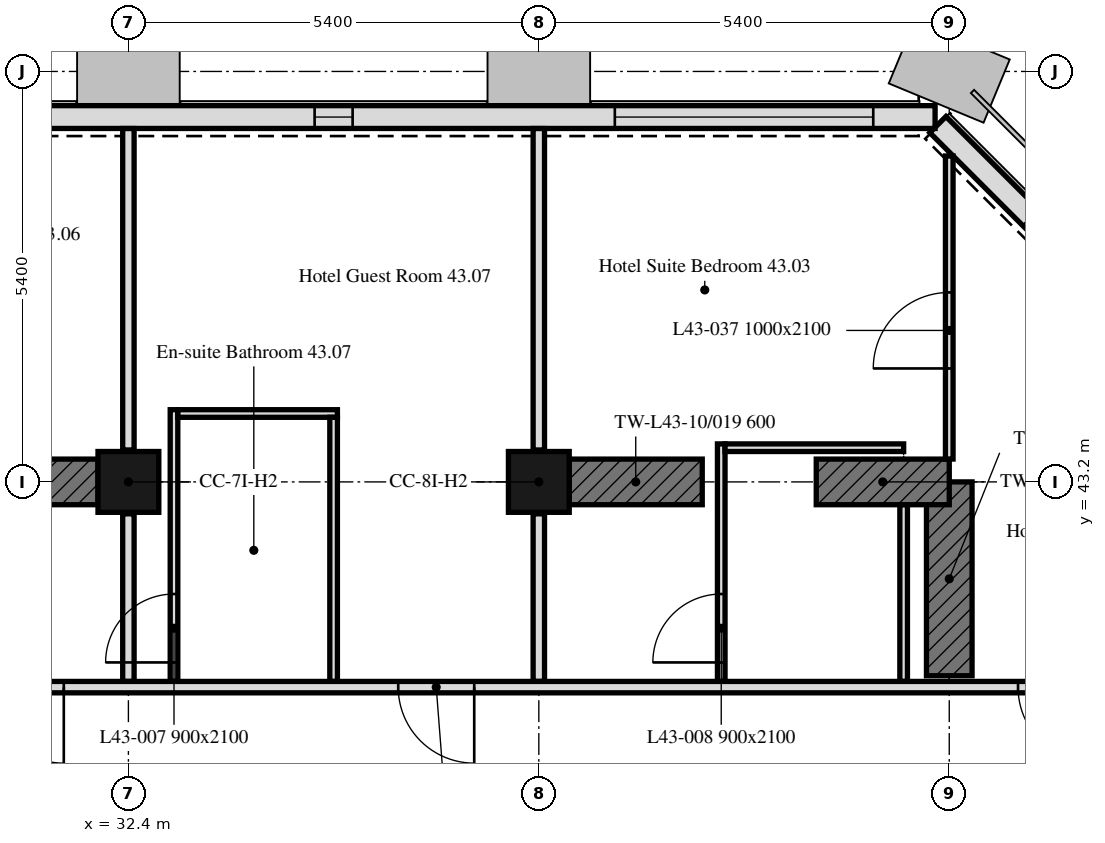
"""IFC4 building model, lengths in metres.
Left out: names, types, materials, properties, quantities, classifications, styles, units other than length and angle.
Written with IfcOpenShell. Run it as: python <this file> out.ifc"""

import sys

from ifc_helpers import new_model, si_unit, direction, frame, frame_2d, origin, origin_2d, place, context, subcontext, project, spatial, rectangle, extrude, element, fill, save


model = new_model("IFC4")
c1 = context("Model", 3, precision=1e-05, world=origin(), true_north=direction((0.0, 1.0)))
c2 = subcontext(c1, "Body", "Model", "MODEL_VIEW")
j1 = project(units=[si_unit("LENGTHUNIT", "METRE"), si_unit("PLANEANGLEUNIT", "RADIAN")], contexts=[c1])
p1 = place(None, origin())
s1 = spatial("IfcSite", under=j1, at=p1, CompositionType="ELEMENT")
p2 = place(p1, origin())
s2 = spatial("IfcBuilding", under=s1, at=p2, CompositionType="ELEMENT")
p3 = place(p2, frame((0.0, 0.0, 180.7)))
s3 = spatial("IfcBuildingStorey", under=s2, at=p3, CompositionType="ELEMENT", Elevation=180.7)
for number, where, z_axis, x_axis in (
    (1, (32.4, 43.2, 0.0), (0.0, 0.0, 1.0), (1.0, 0.0, 0.0)),
    (2, (37.8, 43.2, 0.0), (0.0, 0.0, 1.0), (1.0, 0.0, 0.0)),
):
    element("IfcColumn", number, at=place(p3, frame(where, z_axis=z_axis, x_axis=x_axis)), inside=s3, PredefinedType="COLUMN", context=c2, shape_type="SweptSolid", body=[
        extrude(rectangle(XDim=0.8, YDim=0.8, at=origin_2d()), origin(), (0.0, 0.0, 1.0), 3.0),
    ])
p4 = place(p3, frame((43.2, 40.65, 0.0), z_axis=(0.0, 0.0, 1.0), x_axis=(0.0, 1.0, 0.0)))
e3 = element("IfcWall", 3, at=p4, inside=s3, PredefinedType="SHEAR", context=c2, shape_type="SweptSolid", body=[
    extrude(rectangle(XDim=2.55, YDim=0.6, at=frame_2d((1.275, 0.0))), origin(), (0.0, 0.0, 1.0), 3.0),
])
p5 = place(p3, frame((30.45, 43.2, 0.0), z_axis=(0.0, 0.0, 1.0), x_axis=(1.0, 0.0, 0.0)))
e4 = element("IfcWall", 4, at=p5, inside=s3, PredefinedType="SHEAR", context=c2, shape_type="SweptSolid", body=[
    extrude(rectangle(XDim=1.55, YDim=0.6, at=frame_2d((0.775, 0.0))), origin(), (0.0, 0.0, 1.0), 3.0),
])
for number, where, z_axis, x_axis in (
    (5, (38.2, 43.2, 0.0), (0.0, 0.0, 1.0), (1.0, 0.0, 0.0)),
    (6, (41.45, 43.2, 0.0), (0.0, 0.0, 1.0), (1.0, 0.0, 0.0)),
):
    element("IfcWall", number, at=place(p3, frame(where, z_axis=z_axis, x_axis=x_axis)), inside=s3, PredefinedType="SHEAR", context=c2, shape_type="SweptSolid", body=[
        extrude(rectangle(XDim=1.75, YDim=0.6, at=frame_2d((0.875, 0.0))), origin(), (0.0, 0.0, 1.0), 3.0),
    ])
p6 = place(p3, frame((47.901, 43.051, 0.0), z_axis=(0.0, 0.0, 1.0), x_axis=(-0.707106781187, 0.707106781187, 0.0)))
e7 = element("IfcWall", 7, at=p6, inside=s3, PredefinedType="SOLIDWALL", context=c2, shape_type="SweptSolid", body=[
    extrude(rectangle(XDim=6.86, YDim=0.3, at=frame_2d((3.43, 0.0))), origin(), (0.0, 0.0, 1.0), 3.0),
])
p7 = place(p6, frame((1.73, 0.0, 0.9)))
e8 = element("IfcOpeningElement", 8, at=p7, cuts=e7, PredefinedType="OPENING", context=c2, shape_type="SweptSolid", body=[
    extrude(rectangle(XDim=3.4, YDim=1.7, at=frame_2d((1.7, 0.85))), frame((0.0, 0.16, 0.0), z_axis=(0.0, -1.0, 0.0), x_axis=(1.0, 0.0, 0.0)), (0.0, 0.0, 1.0), 0.32),
])
p8 = place(p3, frame((43.014, 48.0, 0.0), z_axis=(0.0, 0.0, 1.0), x_axis=(-1.0, 0.0, 0.0)))
e9 = element("IfcWall", 9, at=p8, inside=s3, PredefinedType="SOLIDWALL", context=c2, shape_type="SweptSolid", body=[
    extrude(rectangle(XDim=32.027, YDim=0.3, at=frame_2d((16.014, 0.0))), origin(), (0.0, 0.0, 1.0), 3.0),
])
p9 = place(p8, frame((0.814, 0.0, 0.9)))
e10 = element("IfcOpeningElement", 10, at=p9, cuts=e9, PredefinedType="OPENING", context=c2, shape_type="SweptSolid", body=[
    extrude(rectangle(XDim=3.4, YDim=1.7, at=frame_2d((1.7, 0.85))), frame((0.0, 0.16, 0.0), z_axis=(0.0, -1.0, 0.0), x_axis=(1.0, 0.0, 0.0)), (0.0, 0.0, 1.0), 0.32),
])
p10 = place(p8, frame((7.664, 0.0, 0.9)))
e11 = element("IfcOpeningElement", 11, at=p10, cuts=e9, PredefinedType="OPENING", context=c2, shape_type="SweptSolid", body=[
    extrude(rectangle(XDim=0.5, YDim=1.7, at=frame_2d((0.25, 0.85))), frame((0.0, 0.16, 0.0), z_axis=(0.0, -1.0, 0.0), x_axis=(1.0, 0.0, 0.0)), (0.0, 0.0, 1.0), 0.32),
])
p11 = place(p8, frame((13.064, 0.0, 0.9)))
e12 = element("IfcOpeningElement", 12, at=p11, cuts=e9, PredefinedType="OPENING", context=c2, shape_type="SweptSolid", body=[
    extrude(rectangle(XDim=0.5, YDim=1.7, at=frame_2d((0.25, 0.85))), frame((0.0, 0.16, 0.0), z_axis=(0.0, -1.0, 0.0), x_axis=(1.0, 0.0, 0.0)), (0.0, 0.0, 1.0), 0.32),
])
p12 = place(p8, frame((18.464, 0.0, 0.9)))
e13 = element("IfcOpeningElement", 13, at=p12, cuts=e9, PredefinedType="OPENING", context=c2, shape_type="SweptSolid", body=[
    extrude(rectangle(XDim=0.5, YDim=1.7, at=frame_2d((0.25, 0.85))), frame((0.0, 0.16, 0.0), z_axis=(0.0, -1.0, 0.0), x_axis=(1.0, 0.0, 0.0)), (0.0, 0.0, 1.0), 0.32),
])
p13 = place(p8, frame((23.864, 0.0, 0.9)))
e14 = element("IfcOpeningElement", 14, at=p13, cuts=e9, PredefinedType="OPENING", context=c2, shape_type="SweptSolid", body=[
    extrude(rectangle(XDim=0.5, YDim=1.7, at=frame_2d((0.25, 0.85))), frame((0.0, 0.16, 0.0), z_axis=(0.0, -1.0, 0.0), x_axis=(1.0, 0.0, 0.0)), (0.0, 0.0, 1.0), 0.32),
])
p14 = place(p8, frame((28.164, 0.0, 0.9)))
e15 = element("IfcOpeningElement", 15, at=p14, cuts=e9, PredefinedType="OPENING", context=c2, shape_type="SweptSolid", body=[
    extrude(rectangle(XDim=1.1, YDim=1.7, at=frame_2d((0.55, 0.85))), frame((0.0, 0.16, 0.0), z_axis=(0.0, -1.0, 0.0), x_axis=(1.0, 0.0, 0.0)), (0.0, 0.0, 1.0), 0.32),
])
p15 = place(p3, frame((32.4, 40.575, 0.0), z_axis=(0.0, 0.0, 1.0), x_axis=(0.0, 1.0, 0.0)))
e16 = element("IfcWall", 16, at=p15, inside=s3, PredefinedType="PARTITIONING", context=c2, shape_type="SweptSolid", body=[
    extrude(rectangle(XDim=2.205, YDim=0.15, at=frame_2d((1.103, 0.0))), origin(), (0.0, 0.0, 1.0), 2.4),
])
p16 = place(p3, frame((32.4, 43.62, 0.0), z_axis=(0.0, 0.0, 1.0), x_axis=(0.0, 1.0, 0.0)))
e17 = element("IfcWall", 17, at=p16, inside=s3, PredefinedType="PARTITIONING", context=c2, shape_type="SweptSolid", body=[
    extrude(rectangle(XDim=4.229, YDim=0.15, at=frame_2d((2.115, 0.0))), origin(), (0.0, 0.0, 1.0), 2.4),
])
p17 = place(p3, frame((37.8, 40.575, 0.0), z_axis=(0.0, 0.0, 1.0), x_axis=(0.0, 1.0, 0.0)))
e18 = element("IfcWall", 18, at=p17, inside=s3, PredefinedType="PARTITIONING", context=c2, shape_type="SweptSolid", body=[
    extrude(rectangle(XDim=2.205, YDim=0.15, at=frame_2d((1.103, 0.0))), origin(), (0.0, 0.0, 1.0), 2.4),
])
p18 = place(p3, frame((37.8, 43.62, 0.0), z_axis=(0.0, 0.0, 1.0), x_axis=(0.0, 1.0, 0.0)))
e19 = element("IfcWall", 19, at=p18, inside=s3, PredefinedType="PARTITIONING", context=c2, shape_type="SweptSolid", body=[
    extrude(rectangle(XDim=4.229, YDim=0.15, at=frame_2d((2.115, 0.0))), origin(), (0.0, 0.0, 1.0), 2.4),
])
p19 = place(p3, frame((33.0, 40.575, 0.0), z_axis=(0.0, 0.0, 1.0), x_axis=(0.0, 1.0, 0.0)))
e20 = element("IfcWall", 20, at=p19, inside=s3, PredefinedType="PARTITIONING", context=c2, shape_type="SweptSolid", body=[
    extrude(rectangle(XDim=3.575, YDim=0.1, at=frame_2d((1.788, 0.0))), origin(), (0.0, 0.0, 1.0), 3.0),
])
p20 = place(p19, frame((0.25, 0.0, 0.0)))
e21 = element("IfcOpeningElement", 21, at=p20, cuts=e20, PredefinedType="OPENING", context=c2, shape_type="SweptSolid", body=[
    extrude(rectangle(XDim=0.9, YDim=2.1, at=frame_2d((0.45, 1.05))), frame((0.0, 0.05, 0.0), z_axis=(0.0, -1.0, 0.0), x_axis=(1.0, 0.0, 0.0)), (0.0, 0.0, 1.0), 0.1),
])
p21 = place(p3, frame((33.05, 44.1, 0.0), z_axis=(0.0, 0.0, 1.0), x_axis=(1.0, 0.0, 0.0)))
e22 = element("IfcWall", 22, at=p21, inside=s3, PredefinedType="PARTITIONING", context=c2, shape_type="SweptSolid", body=[
    extrude(rectangle(XDim=2.1, YDim=0.1, at=frame_2d((1.05, 0.0))), origin(), (0.0, 0.0, 1.0), 3.0),
])
p22 = place(p3, frame((35.1, 44.05, 0.0), z_axis=(0.0, 0.0, 1.0), x_axis=(0.0, -1.0, 0.0)))
e23 = element("IfcWall", 23, at=p22, inside=s3, PredefinedType="PARTITIONING", context=c2, shape_type="SweptSolid", body=[
    extrude(rectangle(XDim=3.475, YDim=0.1, at=frame_2d((1.738, 0.0))), origin(), (0.0, 0.0, 1.0), 3.0),
])
p23 = place(p3, frame((43.2, 43.501, 0.0), z_axis=(0.0, 0.0, 1.0), x_axis=(0.0, 1.0, 0.0)))
e24 = element("IfcWall", 24, at=p23, inside=s3, PredefinedType="PARTITIONING", context=c2, shape_type="SweptSolid", body=[
    extrude(rectangle(XDim=3.987, YDim=0.1, at=frame_2d((1.993, 0.0))), origin(), (0.0, 0.0, 1.0), 3.0),
])
p24 = place(p23, frame((1.192, 0.0, 0.0)))
e25 = element("IfcOpeningElement", 25, at=p24, cuts=e24, PredefinedType="OPENING", context=c2, shape_type="SweptSolid", body=[
    extrude(rectangle(XDim=1.0, YDim=2.1, at=frame_2d((0.5, 1.05))), frame((0.0, 0.05, 0.0), z_axis=(0.0, -1.0, 0.0), x_axis=(1.0, 0.0, 0.0)), (0.0, 0.0, 1.0), 0.1),
])
p25 = place(p3, frame((40.2, 40.575, 0.0), z_axis=(0.0, 0.0, 1.0), x_axis=(0.0, 1.0, 0.0)))
e26 = element("IfcWall", 26, at=p25, inside=s3, PredefinedType="PARTITIONING", context=c2, shape_type="SweptSolid", body=[
    extrude(rectangle(XDim=3.125, YDim=0.1, at=frame_2d((1.562, 0.0))), origin(), (0.0, 0.0, 1.0), 3.0),
])
p26 = place(p25, frame((0.25, 0.0, 0.0)))
e27 = element("IfcOpeningElement", 27, at=p26, cuts=e26, PredefinedType="OPENING", context=c2, shape_type="SweptSolid", body=[
    extrude(rectangle(XDim=0.9, YDim=2.1, at=frame_2d((0.45, 1.05))), frame((0.0, 0.05, 0.0), z_axis=(0.0, -1.0, 0.0), x_axis=(1.0, 0.0, 0.0)), (0.0, 0.0, 1.0), 0.1),
])
p27 = place(p3, frame((40.25, 43.65, 0.0), z_axis=(0.0, 0.0, 1.0), x_axis=(1.0, 0.0, 0.0)))
e28 = element("IfcWall", 28, at=p27, inside=s3, PredefinedType="PARTITIONING", context=c2, shape_type="SweptSolid", body=[
    extrude(rectangle(XDim=2.35, YDim=0.1, at=frame_2d((1.175, 0.0))), origin(), (0.0, 0.0, 1.0), 3.0),
])
p28 = place(p3, frame((42.6, 42.899, 0.0), z_axis=(0.0, 0.0, 1.0), x_axis=(0.0, -1.0, 0.0)))
e29 = element("IfcWall", 29, at=p28, inside=s3, PredefinedType="PARTITIONING", context=c2, shape_type="SweptSolid", body=[
    extrude(rectangle(XDim=2.324, YDim=0.1, at=frame_2d((1.162, 0.0))), origin(), (0.0, 0.0, 1.0), 3.0),
])
p29 = place(p3, frame((47.849, 40.5, 0.0), z_axis=(0.0, 0.0, 1.0), x_axis=(-1.0, 0.0, 0.0)))
e30 = element("IfcWall", 30, at=p29, inside=s3, PredefinedType="PARTITIONING", context=c2, shape_type="SweptSolid", body=[
    extrude(rectangle(XDim=41.698, YDim=0.15, at=frame_2d((20.849, 0.0))), origin(), (0.0, 0.0, 1.0), 2.4),
])
p30 = place(p29, frame((37.899, 0.0, 0.0)))
e31 = element("IfcOpeningElement", 31, at=p30, cuts=e30, PredefinedType="OPENING", context=c2, shape_type="SweptSolid", body=[
    extrude(rectangle(XDim=1.0, YDim=2.1, at=frame_2d((0.5, 1.05))), frame((0.0, 0.075, 0.0), z_axis=(0.0, -1.0, 0.0), x_axis=(1.0, 0.0, 0.0)), (0.0, 0.0, 1.0), 0.15),
])
p31 = place(p29, frame((32.499, 0.0, 0.0)))
e32 = element("IfcOpeningElement", 32, at=p31, cuts=e30, PredefinedType="OPENING", context=c2, shape_type="SweptSolid", body=[
    extrude(rectangle(XDim=1.0, YDim=2.1, at=frame_2d((0.5, 1.05))), frame((0.0, 0.075, 0.0), z_axis=(0.0, -1.0, 0.0), x_axis=(1.0, 0.0, 0.0)), (0.0, 0.0, 1.0), 0.15),
])
p32 = place(p29, frame((27.099, 0.0, 0.0)))
e33 = element("IfcOpeningElement", 33, at=p32, cuts=e30, PredefinedType="OPENING", context=c2, shape_type="SweptSolid", body=[
    extrude(rectangle(XDim=1.0, YDim=2.1, at=frame_2d((0.5, 1.05))), frame((0.0, 0.075, 0.0), z_axis=(0.0, -1.0, 0.0), x_axis=(1.0, 0.0, 0.0)), (0.0, 0.0, 1.0), 0.15),
])
p33 = place(p29, frame((21.699, 0.0, 0.0)))
e34 = element("IfcOpeningElement", 34, at=p33, cuts=e30, PredefinedType="OPENING", context=c2, shape_type="SweptSolid", body=[
    extrude(rectangle(XDim=1.0, YDim=2.1, at=frame_2d((0.5, 1.05))), frame((0.0, 0.075, 0.0), z_axis=(0.0, -1.0, 0.0), x_axis=(1.0, 0.0, 0.0)), (0.0, 0.0, 1.0), 0.15),
])
p34 = place(p29, frame((16.299, 0.0, 0.0)))
e35 = element("IfcOpeningElement", 35, at=p34, cuts=e30, PredefinedType="OPENING", context=c2, shape_type="SweptSolid", body=[
    extrude(rectangle(XDim=1.0, YDim=2.1, at=frame_2d((0.5, 1.05))), frame((0.0, 0.075, 0.0), z_axis=(0.0, -1.0, 0.0), x_axis=(1.0, 0.0, 0.0)), (0.0, 0.0, 1.0), 0.15),
])
p35 = place(p29, frame((10.899, 0.0, 0.0)))
e36 = element("IfcOpeningElement", 36, at=p35, cuts=e30, PredefinedType="OPENING", context=c2, shape_type="SweptSolid", body=[
    extrude(rectangle(XDim=1.0, YDim=2.1, at=frame_2d((0.5, 1.05))), frame((0.0, 0.075, 0.0), z_axis=(0.0, -1.0, 0.0), x_axis=(1.0, 0.0, 0.0)), (0.0, 0.0, 1.0), 0.15),
])
p36 = place(p29, frame((2.744, 0.0, 0.0)))
e37 = element("IfcOpeningElement", 37, at=p36, cuts=e30, PredefinedType="OPENING", context=c2, shape_type="SweptSolid", body=[
    extrude(rectangle(XDim=1.0, YDim=2.1, at=frame_2d((0.5, 1.05))), frame((0.0, 0.075, 0.0), z_axis=(0.0, -1.0, 0.0), x_axis=(1.0, 0.0, 0.0)), (0.0, 0.0, 1.0), 0.15),
])
p37 = place(p9, origin())
e38 = element("IfcWindow", 38, at=p37, inside=s3, PartitioningType="SINGLE_PANEL", PredefinedType="WINDOW", context=c2, shape_type="SweptSolid", body=[
    extrude(rectangle(XDim=3.4, YDim=1.7, at=frame_2d((1.7, 0.85))), frame((0.0, 0.03, 0.0), z_axis=(0.0, -1.0, 0.0), x_axis=(1.0, 0.0, 0.0)), (0.0, 0.0, 1.0), 0.06),
])
fill(e10, e38)
p38 = place(p10, origin())
e39 = element("IfcWindow", 39, at=p38, inside=s3, PartitioningType="SINGLE_PANEL", PredefinedType="WINDOW", context=c2, shape_type="SweptSolid", body=[
    extrude(rectangle(XDim=0.5, YDim=1.7, at=frame_2d((0.25, 0.85))), frame((0.0, 0.03, 0.0), z_axis=(0.0, -1.0, 0.0), x_axis=(1.0, 0.0, 0.0)), (0.0, 0.0, 1.0), 0.06),
])
fill(e11, e39)
p39 = place(p20, origin())
e40 = element("IfcDoor", 40, at=p39, inside=s3, OperationType="SINGLE_SWING_LEFT", PredefinedType="DOOR", context=c2, shape_type="SweptSolid", body=[
    extrude(rectangle(XDim=0.9, YDim=2.1, at=frame_2d((0.45, 1.05))), frame((0.0, 0.025, 0.0), z_axis=(0.0, -1.0, 0.0), x_axis=(1.0, 0.0, 0.0)), (0.0, 0.0, 1.0), 0.05),
])
fill(e21, e40)
p40 = place(p26, origin())
e41 = element("IfcDoor", 41, at=p40, inside=s3, OperationType="SINGLE_SWING_RIGHT", PredefinedType="DOOR", context=c2, shape_type="SweptSolid", body=[
    extrude(rectangle(XDim=0.9, YDim=2.1, at=frame_2d((0.45, 1.05))), frame((0.0, 0.025, 0.0), z_axis=(0.0, -1.0, 0.0), x_axis=(1.0, 0.0, 0.0)), (0.0, 0.0, 1.0), 0.05),
])
fill(e27, e41)
p41 = place(p34, origin())
e42 = element("IfcDoor", 42, at=p41, inside=s3, OperationType="SINGLE_SWING_LEFT", PredefinedType="DOOR", context=c2, shape_type="SweptSolid", body=[
    extrude(rectangle(XDim=1.0, YDim=2.1, at=frame_2d((0.5, 1.05))), frame((0.0, 0.025, 0.0), z_axis=(0.0, -1.0, 0.0), x_axis=(1.0, 0.0, 0.0)), (0.0, 0.0, 1.0), 0.05),
])
fill(e35, e42)
p42 = place(p35, origin())
e43 = element("IfcDoor", 43, at=p42, inside=s3, OperationType="SINGLE_SWING_RIGHT", PredefinedType="DOOR", context=c2, shape_type="SweptSolid", body=[
    extrude(rectangle(XDim=1.0, YDim=2.1, at=frame_2d((0.5, 1.05))), frame((0.0, 0.025, 0.0), z_axis=(0.0, -1.0, 0.0), x_axis=(1.0, 0.0, 0.0)), (0.0, 0.0, 1.0), 0.05),
])
fill(e36, e43)
p43 = place(p24, origin())
e44 = element("IfcDoor", 44, at=p43, inside=s3, OperationType="SINGLE_SWING_RIGHT", PredefinedType="DOOR", context=c2, shape_type="SweptSolid", body=[
    extrude(rectangle(XDim=1.0, YDim=2.1, at=frame_2d((0.5, 1.05))), frame((0.0, 0.025, 0.0), z_axis=(0.0, -1.0, 0.0), x_axis=(1.0, 0.0, 0.0)), (0.0, 0.0, 1.0), 0.05),
])
fill(e25, e44)
p44 = place(p36, origin())
e45 = element("IfcDoor", 45, at=p44, inside=s3, OperationType="SINGLE_SWING_LEFT", PredefinedType="DOOR", context=c2, shape_type="SweptSolid", body=[
    extrude(rectangle(XDim=1.0, YDim=2.1, at=frame_2d((0.5, 1.05))), frame((0.0, 0.025, 0.0), z_axis=(0.0, -1.0, 0.0), x_axis=(1.0, 0.0, 0.0)), (0.0, 0.0, 1.0), 0.05),
])
fill(e37, e45)
save(model, sys.argv[1])
